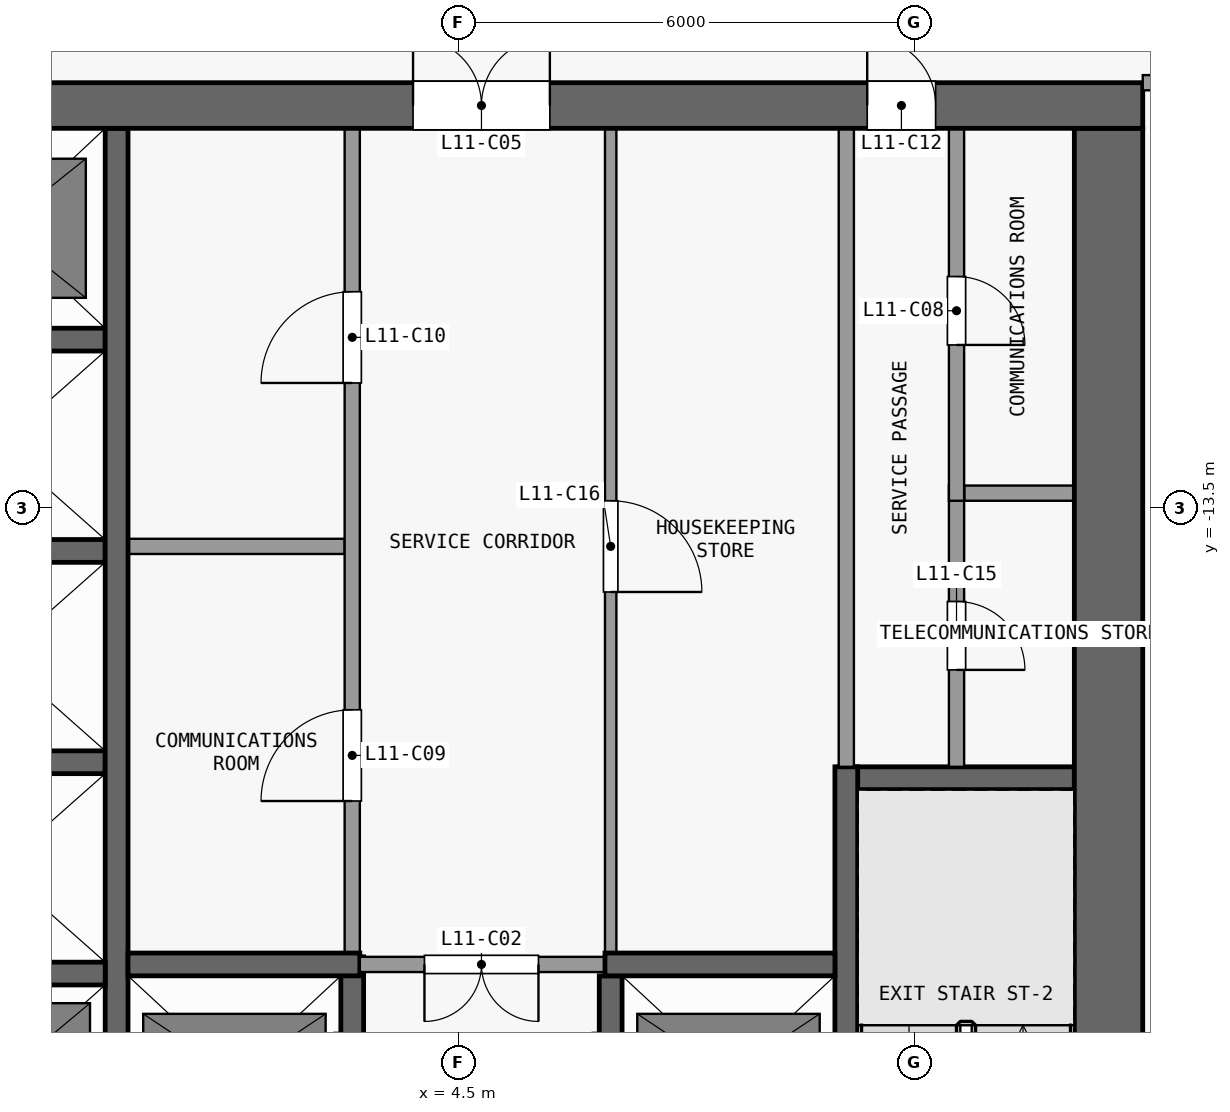
"""IFC4 building model, lengths in metres.
Left out: names, types, materials, properties, quantities, classifications, styles, units other than length and angle.
Written with IfcOpenShell. Run it as: python <this file> out.ifc"""

import sys

from ifc_helpers import new_model, si_unit, direction, frame, frame_2d, origin, place, context, subcontext, project, spatial, rectangle, extrude, element, fill, save


model = new_model("IFC4")
c1 = context("Model", 3, precision=1e-05, world=origin(), true_north=direction((0.0, 1.0)))
c2 = subcontext(c1, "Body", "Model", "MODEL_VIEW")
j1 = project(units=[si_unit("LENGTHUNIT", "METRE"), si_unit("PLANEANGLEUNIT", "RADIAN")], contexts=[c1])
p1 = place(None, origin())
s1 = spatial("IfcSite", under=j1, at=p1, CompositionType="ELEMENT")
p2 = place(p1, origin())
s2 = spatial("IfcBuilding", under=s1, at=p2, CompositionType="ELEMENT")
p3 = place(p2, frame((0.0, 0.0, 50.5)))
s3 = spatial("IfcBuildingStorey", under=s2, at=p3, CompositionType="ELEMENT", Elevation=50.5)
p4 = place(p3, frame((-13.5, -8.2, 0.0), z_axis=(0.0, 0.0, 1.0), x_axis=(1.0, 0.0, 0.0)))
e1 = element("IfcWall", 1, at=p4, inside=s3, PredefinedType="SHEAR", context=c2, shape_type="SweptSolid", body=[
    extrude(rectangle(XDim=27.0, YDim=0.6, at=frame_2d((13.5, 0.0))), origin(), (0.0, 0.0, 1.0), 3.3),
])
p5 = place(p4, frame((7.8, 0.0, 0.0)))
e2 = element("IfcOpeningElement", 2, at=p5, cuts=e1, PredefinedType="OPENING", context=c2, shape_type="SweptSolid", body=[
    extrude(rectangle(XDim=1.8, YDim=2.1, at=frame_2d((0.9, 1.05))), frame((0.0, 0.31, 0.0), z_axis=(0.0, -1.0, 0.0), x_axis=(1.0, 0.0, 0.0)), (0.0, 0.0, 1.0), 0.62),
])
p6 = place(p4, frame((17.4, 0.0, 0.0)))
e3 = element("IfcOpeningElement", 3, at=p6, cuts=e1, PredefinedType="OPENING", context=c2, shape_type="SweptSolid", body=[
    extrude(rectangle(XDim=1.8, YDim=2.1, at=frame_2d((0.9, 1.05))), frame((0.0, 0.31, 0.0), z_axis=(0.0, -1.0, 0.0), x_axis=(1.0, 0.0, 0.0)), (0.0, 0.0, 1.0), 0.62),
])
p7 = place(p4, frame((2.725, 0.0, 0.0)))
e4 = element("IfcOpeningElement", 4, at=p7, cuts=e1, PredefinedType="OPENING", context=c2, shape_type="SweptSolid", body=[
    extrude(rectangle(XDim=0.9, YDim=2.1, at=frame_2d((0.45, 1.05))), frame((0.0, 0.31, 0.0), z_axis=(0.0, -1.0, 0.0), x_axis=(1.0, 0.0, 0.0)), (0.0, 0.0, 1.0), 0.62),
])
p8 = place(p4, frame((23.375, 0.0, 0.0)))
e5 = element("IfcOpeningElement", 5, at=p8, cuts=e1, PredefinedType="OPENING", context=c2, shape_type="SweptSolid", body=[
    extrude(rectangle(XDim=0.9, YDim=2.1, at=frame_2d((0.45, 1.05))), frame((0.0, 0.31, 0.0), z_axis=(0.0, -1.0, 0.0), x_axis=(1.0, 0.0, 0.0)), (0.0, 0.0, 1.0), 0.62),
])
p9 = place(p3, frame((13.05, -24.6, 0.0), z_axis=(0.0, 0.0, 1.0), x_axis=(0.0, 1.0, 0.0)))
e6 = element("IfcWall", 6, at=p9, inside=s3, PredefinedType="SHEAR", context=c2, shape_type="SweptSolid", body=[
    extrude(rectangle(XDim=16.1, YDim=0.9, at=frame_2d((8.05, 0.0))), origin(), (0.0, 0.0, 1.0), 3.3),
])
p10 = place(p3, frame((-2.95, -19.62, 0.0), z_axis=(0.0, 0.0, 1.0), x_axis=(1.0, 0.0, 0.0)))
e7 = element("IfcWall", 7, at=p10, inside=s3, PredefinedType="SHEAR", context=c2, shape_type="SweptSolid", body=[
    extrude(rectangle(XDim=2.8, YDim=0.3, at=frame_2d((1.4, 0.0))), origin(), (0.0, 0.0, 1.0), 3.3),
])
p11 = place(p3, frame((0.15, -19.5, 0.0), z_axis=(0.0, 0.0, 1.0), x_axis=(1.0, 0.0, 0.0)))
e8 = element("IfcWall", 8, at=p11, inside=s3, PredefinedType="SHEAR", context=c2, shape_type="SweptSolid", body=[
    extrude(rectangle(XDim=3.05, YDim=0.3, at=frame_2d((1.525, 0.0))), origin(), (0.0, 0.0, 1.0), 3.3),
])
p12 = place(p3, frame((6.575, -19.5, 0.0), z_axis=(0.0, 0.0, 1.0), x_axis=(-1.0, 0.0, 0.0)))
e9 = element("IfcWall", 9, at=p12, inside=s3, PredefinedType="PARTITIONING", context=c2, shape_type="SweptSolid", body=[
    extrude(rectangle(XDim=3.375, YDim=0.2, at=frame_2d((1.688, 0.0))), origin(), (0.0, 0.0, 1.0), 3.3),
])
p13 = place(p12, frame((1.025, 0.0, 0.0)))
e10 = element("IfcOpeningElement", 10, at=p13, cuts=e9, PredefinedType="OPENING", context=c2, shape_type="SweptSolid", body=[
    extrude(rectangle(XDim=1.5, YDim=2.1, at=frame_2d((0.75, 1.05))), frame((0.0, 0.11, 0.0), z_axis=(0.0, -1.0, 0.0), x_axis=(1.0, 0.0, 0.0)), (0.0, 0.0, 1.0), 0.22),
])
p14 = place(p3, frame((6.425, -19.5, 0.0), z_axis=(0.0, 0.0, 1.0), x_axis=(1.0, 0.0, 0.0)))
e11 = element("IfcWall", 11, at=p14, inside=s3, PredefinedType="SHEAR", context=c2, shape_type="SweptSolid", body=[
    extrude(rectangle(XDim=3.025, YDim=0.3, at=frame_2d((1.512, 0.0))), origin(), (0.0, 0.0, 1.0), 3.3),
])
p15 = place(p3, frame((9.5, -17.05, 0.0), z_axis=(0.0, 0.0, 1.0), x_axis=(1.0, 0.0, 0.0)))
e12 = element("IfcWall", 12, at=p15, inside=s3, PredefinedType="SHEAR", context=c2, shape_type="SweptSolid", body=[
    extrude(rectangle(XDim=3.1, YDim=0.3, at=frame_2d((1.55, 0.0))), origin(), (0.0, 0.0, 1.0), 3.3),
])
for number, where, z_axis, x_axis in (
    (13, (-2.95, -16.84, 0.0), (0.0, 0.0, 1.0), (1.0, 0.0, 0.0)),
    (14, (-2.95, -14.06, 0.0), (0.0, 0.0, 1.0), (1.0, 0.0, 0.0)),
):
    element("IfcWall", number, at=place(p3, frame(where, z_axis=z_axis, x_axis=x_axis)), inside=s3, PredefinedType="SHEAR", context=c2, shape_type="SweptSolid", body=[
        extrude(rectangle(XDim=2.8, YDim=0.3, at=frame_2d((1.4, 0.0))), origin(), (0.0, 0.0, 1.0), 3.3),
    ])
p16 = place(p3, frame((0.15, -14.0, 0.0), z_axis=(0.0, 0.0, 1.0), x_axis=(1.0, 0.0, 0.0)))
e15 = element("IfcWall", 15, at=p16, inside=s3, PredefinedType="PARTITIONING", context=c2, shape_type="SweptSolid", body=[
    extrude(rectangle(XDim=2.85, YDim=0.2, at=frame_2d((1.425, 0.0))), origin(), (0.0, 0.0, 1.0), 3.3),
])
p17 = place(p3, frame((11.15, -13.3, 0.0), z_axis=(0.0, 0.0, 1.0), x_axis=(1.0, 0.0, 0.0)))
e16 = element("IfcWall", 16, at=p17, inside=s3, PredefinedType="PARTITIONING", context=c2, shape_type="SweptSolid", body=[
    extrude(rectangle(XDim=1.45, YDim=0.2, at=frame_2d((0.725, 0.0))), origin(), (0.0, 0.0, 1.0), 3.3),
])
p18 = place(p3, frame((-2.95, -11.28, 0.0), z_axis=(0.0, 0.0, 1.0), x_axis=(1.0, 0.0, 0.0)))
e17 = element("IfcWall", 17, at=p18, inside=s3, PredefinedType="SHEAR", context=c2, shape_type="SweptSolid", body=[
    extrude(rectangle(XDim=2.8, YDim=0.3, at=frame_2d((1.4, 0.0))), origin(), (0.0, 0.0, 1.0), 3.3),
])
p19 = place(p3, frame((0.0, -22.25, 0.0), z_axis=(0.0, 0.0, 1.0), x_axis=(0.0, 1.0, 0.0)))
e18 = element("IfcWall", 18, at=p19, inside=s3, PredefinedType="SHEAR", context=c2, shape_type="SweptSolid", body=[
    extrude(rectangle(XDim=13.75, YDim=0.3, at=frame_2d((6.875, 0.0))), origin(), (0.0, 0.0, 1.0), 3.3),
])
p20 = place(p3, frame((3.1, -22.25, 0.0), z_axis=(0.0, 0.0, 1.0), x_axis=(0.0, 1.0, 0.0)))
e19 = element("IfcWall", 19, at=p20, inside=s3, PredefinedType="SHEAR", context=c2, shape_type="SweptSolid", body=[
    extrude(rectangle(XDim=2.85, YDim=0.3, at=frame_2d((1.425, 0.0))), origin(), (0.0, 0.0, 1.0), 3.3),
])
p21 = place(p20, frame((0.75, 0.0, 0.0)))
e20 = element("IfcOpeningElement", 20, at=p21, cuts=e19, PredefinedType="OPENING", context=c2, shape_type="SweptSolid", body=[
    extrude(rectangle(XDim=1.1, YDim=2.1, at=frame_2d((0.55, 1.05))), frame((0.0, 0.16, 0.0), z_axis=(0.0, -1.0, 0.0), x_axis=(1.0, 0.0, 0.0)), (0.0, 0.0, 1.0), 0.32),
])
p22 = place(p3, frame((3.1, -19.6, 0.0), z_axis=(0.0, 0.0, 1.0), x_axis=(0.0, 1.0, 0.0)))
e21 = element("IfcWall", 21, at=p22, inside=s3, PredefinedType="PARTITIONING", context=c2, shape_type="SweptSolid", body=[
    extrude(rectangle(XDim=11.1, YDim=0.2, at=frame_2d((5.55, 0.0))), origin(), (0.0, 0.0, 1.0), 3.3),
])
p23 = place(p22, frame((2.25, 0.0, 0.0)))
e22 = element("IfcOpeningElement", 22, at=p23, cuts=e21, PredefinedType="OPENING", context=c2, shape_type="SweptSolid", body=[
    extrude(rectangle(XDim=1.2, YDim=2.1, at=frame_2d((0.6, 1.05))), frame((0.0, 0.11, 0.0), z_axis=(0.0, -1.0, 0.0), x_axis=(1.0, 0.0, 0.0)), (0.0, 0.0, 1.0), 0.22),
])
p24 = place(p22, frame((7.75, 0.0, 0.0)))
e23 = element("IfcOpeningElement", 23, at=p24, cuts=e21, PredefinedType="OPENING", context=c2, shape_type="SweptSolid", body=[
    extrude(rectangle(XDim=1.2, YDim=2.1, at=frame_2d((0.6, 1.05))), frame((0.0, 0.11, 0.0), z_axis=(0.0, -1.0, 0.0), x_axis=(1.0, 0.0, 0.0)), (0.0, 0.0, 1.0), 0.22),
])
p25 = place(p3, frame((6.5, -22.25, 0.0), z_axis=(0.0, 0.0, 1.0), x_axis=(0.0, 1.0, 0.0)))
e24 = element("IfcWall", 24, at=p25, inside=s3, PredefinedType="SHEAR", context=c2, shape_type="SweptSolid", body=[
    extrude(rectangle(XDim=2.6, YDim=0.3, at=frame_2d((1.3, 0.0))), origin(), (0.0, 0.0, 1.0), 3.3),
])
p26 = place(p25, frame((0.75, 0.0, 0.0)))
e25 = element("IfcOpeningElement", 25, at=p26, cuts=e24, PredefinedType="OPENING", context=c2, shape_type="SweptSolid", body=[
    extrude(rectangle(XDim=1.1, YDim=2.1, at=frame_2d((0.55, 1.05))), frame((0.0, 0.16, 0.0), z_axis=(0.0, -1.0, 0.0), x_axis=(1.0, 0.0, 0.0)), (0.0, 0.0, 1.0), 0.32),
])
p27 = place(p3, frame((6.5, -8.5, 0.0), z_axis=(0.0, 0.0, 1.0), x_axis=(0.0, -1.0, 0.0)))
e26 = element("IfcWall", 26, at=p27, inside=s3, PredefinedType="PARTITIONING", context=c2, shape_type="SweptSolid", body=[
    extrude(rectangle(XDim=10.85, YDim=0.15, at=frame_2d((5.425, 0.0))), origin(), (0.0, 0.0, 1.0), 3.3),
])
p28 = place(p27, frame((4.9, 0.0, 0.0)))
e27 = element("IfcOpeningElement", 27, at=p28, cuts=e26, PredefinedType="OPENING", context=c2, shape_type="SweptSolid", body=[
    extrude(rectangle(XDim=1.2, YDim=2.1, at=frame_2d((0.6, 1.05))), frame((0.0, 0.085, 0.0), z_axis=(0.0, -1.0, 0.0), x_axis=(1.0, 0.0, 0.0)), (0.0, 0.0, 1.0), 0.17),
])
p29 = place(p3, frame((9.6, -16.9, 0.0), z_axis=(0.0, 0.0, 1.0), x_axis=(0.0, -1.0, 0.0)))
e28 = element("IfcWall", 28, at=p29, inside=s3, PredefinedType="SHEAR", context=c2, shape_type="SweptSolid", body=[
    extrude(rectangle(XDim=7.7, YDim=0.3, at=frame_2d((3.85, 0.0))), origin(), (0.0, 0.0, 1.0), 3.3),
])
p30 = place(p29, frame((6.5, 0.0, 0.0)))
e29 = element("IfcOpeningElement", 29, at=p30, cuts=e28, PredefinedType="OPENING", context=c2, shape_type="SweptSolid", body=[
    extrude(rectangle(XDim=1.1, YDim=2.1, at=frame_2d((0.55, 1.05))), frame((0.0, 0.16, 0.0), z_axis=(0.0, -1.0, 0.0), x_axis=(1.0, 0.0, 0.0)), (0.0, 0.0, 1.0), 0.32),
])
p31 = place(p3, frame((9.6, -16.9, 0.0), z_axis=(0.0, 0.0, 1.0), x_axis=(0.0, 1.0, 0.0)))
e30 = element("IfcWall", 30, at=p31, inside=s3, PredefinedType="PARTITIONING", context=c2, shape_type="SweptSolid", body=[
    extrude(rectangle(XDim=8.4, YDim=0.2, at=frame_2d((4.2, 0.0))), origin(), (0.0, 0.0, 1.0), 3.3),
])
p32 = place(p3, frame((11.05, -13.2, 0.0), z_axis=(0.0, 0.0, 1.0), x_axis=(0.0, -1.0, 0.0)))
e31 = element("IfcWall", 31, at=p32, inside=s3, PredefinedType="PARTITIONING", context=c2, shape_type="SweptSolid", body=[
    extrude(rectangle(XDim=3.7, YDim=0.2, at=frame_2d((1.85, 0.0))), origin(), (0.0, 0.0, 1.0), 3.3),
])
p33 = place(p32, frame((1.525, 0.0, 0.0)))
e32 = element("IfcOpeningElement", 32, at=p33, cuts=e31, PredefinedType="OPENING", context=c2, shape_type="SweptSolid", body=[
    extrude(rectangle(XDim=0.9, YDim=2.1, at=frame_2d((0.45, 1.05))), frame((0.0, 0.11, 0.0), z_axis=(0.0, -1.0, 0.0), x_axis=(1.0, 0.0, 0.0)), (0.0, 0.0, 1.0), 0.22),
])
p34 = place(p3, frame((11.05, -8.5, 0.0), z_axis=(0.0, 0.0, 1.0), x_axis=(0.0, -1.0, 0.0)))
e33 = element("IfcWall", 33, at=p34, inside=s3, PredefinedType="PARTITIONING", context=c2, shape_type="SweptSolid", body=[
    extrude(rectangle(XDim=4.9, YDim=0.2, at=frame_2d((2.45, 0.0))), origin(), (0.0, 0.0, 1.0), 3.3),
])
p35 = place(p34, frame((1.95, 0.0, 0.0)))
e34 = element("IfcOpeningElement", 34, at=p35, cuts=e33, PredefinedType="OPENING", context=c2, shape_type="SweptSolid", body=[
    extrude(rectangle(XDim=0.9, YDim=2.1, at=frame_2d((0.45, 1.05))), frame((0.0, 0.11, 0.0), z_axis=(0.0, -1.0, 0.0), x_axis=(1.0, 0.0, 0.0)), (0.0, 0.0, 1.0), 0.22),
])
p36 = place(p3, frame((13.5, -7.9, 0.0), z_axis=(0.0, 0.0, 1.0), x_axis=(1.0, 0.0, 0.0)))
e35 = element("IfcWall", 35, at=p36, inside=s3, PredefinedType="PARTITIONING", context=c2, shape_type="SweptSolid", body=[
    extrude(rectangle(XDim=11.75, YDim=0.2, at=frame_2d((5.875, 0.0))), origin(), (0.0, 0.0, 1.0), 3.3),
])
p37 = place(p36, frame((1.0, 0.0, 0.0)))
e36 = element("IfcOpeningElement", 36, at=p37, cuts=e35, PredefinedType="OPENING", context=c2, shape_type="SweptSolid", body=[
    extrude(rectangle(XDim=1.0, YDim=2.1, at=frame_2d((0.5, 1.05))), frame((0.0, 0.11, 0.0), z_axis=(0.0, -1.0, 0.0), x_axis=(1.0, 0.0, 0.0)), (0.0, 0.0, 1.0), 0.22),
])
p38 = place(p13, origin())
e37 = element("IfcDoor", 37, at=p38, inside=s3, OperationType="DOUBLE_DOOR_SINGLE_SWING", PredefinedType="DOOR", context=c2, shape_type="SweptSolid", body=[
    extrude(rectangle(XDim=1.5, YDim=2.1, at=frame_2d((0.75, 1.05))), frame((0.0, 0.025, 0.0), z_axis=(0.0, -1.0, 0.0), x_axis=(1.0, 0.0, 0.0)), (0.0, 0.0, 1.0), 0.05),
])
fill(e10, e37)
p39 = place(p6, origin())
e38 = element("IfcDoor", 38, at=p39, inside=s3, OperationType="DOUBLE_DOOR_SINGLE_SWING", PredefinedType="DOOR", context=c2, shape_type="SweptSolid", body=[
    extrude(rectangle(XDim=1.8, YDim=2.1, at=frame_2d((0.9, 1.05))), frame((0.0, 0.025, 0.0), z_axis=(0.0, -1.0, 0.0), x_axis=(1.0, 0.0, 0.0)), (0.0, 0.0, 1.0), 0.05),
])
fill(e3, e38)
p40 = place(p35, origin())
e39 = element("IfcDoor", 39, at=p40, inside=s3, OperationType="SINGLE_SWING_RIGHT", PredefinedType="DOOR", context=c2, shape_type="SweptSolid", body=[
    extrude(rectangle(XDim=0.9, YDim=2.1, at=frame_2d((0.45, 1.05))), frame((0.0, 0.025, 0.0), z_axis=(0.0, -1.0, 0.0), x_axis=(1.0, 0.0, 0.0)), (0.0, 0.0, 1.0), 0.05),
])
fill(e34, e39)
p41 = place(p23, origin())
e40 = element("IfcDoor", 40, at=p41, inside=s3, OperationType="SINGLE_SWING_LEFT", PredefinedType="DOOR", context=c2, shape_type="SweptSolid", body=[
    extrude(rectangle(XDim=1.2, YDim=2.1, at=frame_2d((0.6, 1.05))), frame((0.0, 0.025, 0.0), z_axis=(0.0, -1.0, 0.0), x_axis=(1.0, 0.0, 0.0)), (0.0, 0.0, 1.0), 0.05),
])
fill(e22, e40)
p42 = place(p24, origin())
e41 = element("IfcDoor", 41, at=p42, inside=s3, OperationType="SINGLE_SWING_LEFT", PredefinedType="DOOR", context=c2, shape_type="SweptSolid", body=[
    extrude(rectangle(XDim=1.2, YDim=2.1, at=frame_2d((0.6, 1.05))), frame((0.0, 0.025, 0.0), z_axis=(0.0, -1.0, 0.0), x_axis=(1.0, 0.0, 0.0)), (0.0, 0.0, 1.0), 0.05),
])
fill(e23, e41)
p43 = place(p8, origin())
e42 = element("IfcDoor", 42, at=p43, inside=s3, OperationType="SINGLE_SWING_LEFT", PredefinedType="DOOR", context=c2, shape_type="SweptSolid", body=[
    extrude(rectangle(XDim=0.9, YDim=2.1, at=frame_2d((0.45, 1.05))), frame((0.0, 0.025, 0.0), z_axis=(0.0, -1.0, 0.0), x_axis=(1.0, 0.0, 0.0)), (0.0, 0.0, 1.0), 0.05),
])
fill(e5, e42)
p44 = place(p33, origin())
e43 = element("IfcDoor", 43, at=p44, inside=s3, OperationType="SINGLE_SWING_RIGHT", PredefinedType="DOOR", context=c2, shape_type="SweptSolid", body=[
    extrude(rectangle(XDim=0.9, YDim=2.1, at=frame_2d((0.45, 1.05))), frame((0.0, 0.025, 0.0), z_axis=(0.0, -1.0, 0.0), x_axis=(1.0, 0.0, 0.0)), (0.0, 0.0, 1.0), 0.05),
])
fill(e32, e43)
p45 = place(p28, origin())
e44 = element("IfcDoor", 44, at=p45, inside=s3, OperationType="SINGLE_SWING_RIGHT", PredefinedType="DOOR", context=c2, shape_type="SweptSolid", body=[
    extrude(rectangle(XDim=1.2, YDim=2.1, at=frame_2d((0.6, 1.05))), frame((0.0, 0.025, 0.0), z_axis=(0.0, -1.0, 0.0), x_axis=(1.0, 0.0, 0.0)), (0.0, 0.0, 1.0), 0.05),
])
fill(e27, e44)
save(model, sys.argv[1])
